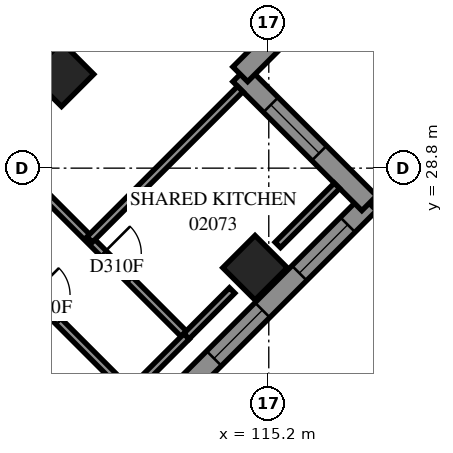
"""IFC4 building model, lengths in metres.
Left out: names, types, materials, properties, quantities, classifications, styles, units other than length and angle.
Written with IfcOpenShell. Run it as: python <this file> out.ifc"""

import sys

from ifc_helpers import new_model, si_unit, direction, frame, frame_2d, origin, origin_2d, place, context, subcontext, project, spatial, polyline, rectangle, outline, extrude, element, fill, save


model = new_model("IFC4")
c1 = context("Model", 3, precision=1e-05, world=origin(), true_north=direction((0.0, 1.0)))
c2 = subcontext(c1, "Body", "Model", "MODEL_VIEW")
j1 = project(units=[si_unit("LENGTHUNIT", "METRE"), si_unit("PLANEANGLEUNIT", "RADIAN")], contexts=[c1])
p1 = place(None, origin())
s1 = spatial("IfcSite", under=j1, at=p1, CompositionType="ELEMENT")
p2 = place(p1, origin())
s2 = spatial("IfcBuilding", under=s1, at=p2, CompositionType="ELEMENT")
p3 = place(p2, frame((0.0, 0.0, 10.2)))
s3 = spatial("IfcBuildingStorey", under=s2, at=p3, CompositionType="ELEMENT", Elevation=10.2)
for number, where, z_axis, x_axis in (
    (1, (109.747, 31.271, 0.0), (0.0, 0.0, 1.0), (0.707, -0.707, 0.0)),
    (2, (114.838, 26.18, 0.0), (0.0, 0.0, 1.0), (0.707, -0.707, 0.0)),
):
    element("IfcColumn", number, at=place(p3, frame(where, z_axis=z_axis, x_axis=x_axis)), inside=s3, PredefinedType="COLUMN", context=c2, shape_type="SweptSolid", body=[
        extrude(rectangle(XDim=1.2, YDim=1.2, at=origin_2d()), origin(), (0.0, 0.0, 1.0), 3.8),
    ])
p4 = place(p3, frame((104.656, 14.689, 0.0), z_axis=(0.0, 0.0, 1.0), x_axis=(0.7071094621, 0.7071041002, 0.0)))
e3 = element("IfcWall", 3, at=p4, inside=s3, PredefinedType="SOLIDWALL", context=c2, shape_type="SweptSolid", body=[
    extrude(outline(polyline([(-0.275, -0.275), (18.925, -0.275), (18.375, 0.275), (0.275, 0.275), (-0.275, -0.275)])), origin(), (0.0, 0.0, 1.0), 3.8),
])
p5 = place(p4, frame((1.825, 0.0, 0.7)))
e4 = element("IfcOpeningElement", 4, at=p5, cuts=e3, PredefinedType="OPENING", context=c2, shape_type="SweptSolid", body=[
    extrude(rectangle(XDim=1.8, YDim=2.6, at=frame_2d((0.9, 1.3))), frame((0.0, 0.285, 0.0), z_axis=(0.0, -1.0, 0.0), x_axis=(1.0, 0.0, 0.0)), (0.0, 0.0, 1.0), 0.57),
])
p6 = place(p4, frame((5.425, 0.0, 0.7)))
e5 = element("IfcOpeningElement", 5, at=p6, cuts=e3, PredefinedType="OPENING", context=c2, shape_type="SweptSolid", body=[
    extrude(rectangle(XDim=1.8, YDim=2.6, at=frame_2d((0.9, 1.3))), frame((0.0, 0.285, 0.0), z_axis=(0.0, -1.0, 0.0), x_axis=(1.0, 0.0, 0.0)), (0.0, 0.0, 1.0), 0.57),
])
p7 = place(p4, frame((8.725, 0.0, 0.7)))
e6 = element("IfcOpeningElement", 6, at=p7, cuts=e3, PredefinedType="OPENING", context=c2, shape_type="SweptSolid", body=[
    extrude(rectangle(XDim=1.8, YDim=2.6, at=frame_2d((0.9, 1.3))), frame((0.0, 0.285, 0.0), z_axis=(0.0, -1.0, 0.0), x_axis=(1.0, 0.0, 0.0)), (0.0, 0.0, 1.0), 0.57),
])
p8 = place(p4, frame((12.875, 0.0, 0.7)))
e7 = element("IfcOpeningElement", 7, at=p8, cuts=e3, PredefinedType="OPENING", context=c2, shape_type="SweptSolid", body=[
    extrude(rectangle(XDim=1.8, YDim=2.6, at=frame_2d((0.9, 1.3))), frame((0.0, 0.285, 0.0), z_axis=(0.0, -1.0, 0.0), x_axis=(1.0, 0.0, 0.0)), (0.0, 0.0, 1.0), 0.57),
])
p9 = place(p4, frame((16.05, 0.0, 0.7)))
e8 = element("IfcOpeningElement", 8, at=p9, cuts=e3, PredefinedType="OPENING", context=c2, shape_type="SweptSolid", body=[
    extrude(rectangle(XDim=1.8, YDim=2.6, at=frame_2d((0.9, 1.3))), frame((0.0, 0.285, 0.0), z_axis=(0.0, -1.0, 0.0), x_axis=(1.0, 0.0, 0.0)), (0.0, 0.0, 1.0), 0.57),
])
p10 = place(p3, frame((117.843, 27.877, 0.0), z_axis=(0.0, 0.0, 1.0), x_axis=(-0.7071067812, 0.7071067812, 0.0)))
e9 = element("IfcWall", 9, at=p10, inside=s3, PredefinedType="SOLIDWALL", context=c2, shape_type="SweptSolid", body=[
    extrude(outline(polyline([(-0.275, -0.275), (4.525, -0.275), (5.075, 0.275), (0.275, 0.275), (-0.275, -0.275)])), origin(), (0.0, 0.0, 1.0), 3.8),
])
p11 = place(p10, frame((1.863, 0.0, 0.7)))
e10 = element("IfcOpeningElement", 10, at=p11, cuts=e9, PredefinedType="OPENING", context=c2, shape_type="SweptSolid", body=[
    extrude(rectangle(XDim=1.8, YDim=2.6, at=frame_2d((0.9, 1.3))), frame((0.0, 0.285, 0.0), z_axis=(0.0, -1.0, 0.0), x_axis=(1.0, 0.0, 0.0)), (0.0, 0.0, 1.0), 0.57),
])
p12 = place(p3, frame((114.449, 31.271, 0.0), z_axis=(0.0, 0.0, 1.0), x_axis=(0.7070963646, 0.7071171977, 0.0)))
e11 = element("IfcWall", 11, at=p12, inside=s3, PredefinedType="SOLIDWALL", context=c2, shape_type="SweptSolid", body=[
    extrude(outline(polyline([(0.275, -0.275), (5.075, -0.275), (4.525, 0.275), (-0.275, 0.275), (0.275, -0.275)])), origin(), (0.0, 0.0, 1.0), 3.8),
])
p13 = place(p12, frame((1.137, 0.0, 0.7)))
e12 = element("IfcOpeningElement", 12, at=p13, cuts=e11, PredefinedType="OPENING", context=c2, shape_type="SweptSolid", body=[
    extrude(rectangle(XDim=1.8, YDim=2.6, at=frame_2d((0.9, 1.3))), frame((0.0, 0.285, 0.0), z_axis=(0.0, -1.0, 0.0), x_axis=(1.0, 0.0, 0.0)), (0.0, 0.0, 1.0), 0.57),
])
p14 = place(p3, frame((94.861, 42.544, 0.0), z_axis=(0.0, 0.0, 1.0), x_axis=(0.7071067812, -0.7071067812, 0.0)))
e13 = element("IfcWall", 13, at=p14, inside=s3, PredefinedType="PARTITIONING", context=c2, shape_type="SweptSolid", body=[
    extrude(rectangle(XDim=25.699, YDim=0.2, at=frame_2d((12.85, 0.0))), origin(), (0.0, 0.0, 1.0), 3.8),
])
p15 = place(p14, frame((10.072, 0.0, 0.0)))
e14 = element("IfcOpeningElement", 14, at=p15, cuts=e13, PredefinedType="OPENING", context=c2, shape_type="SweptSolid", body=[
    extrude(rectangle(XDim=1.0, YDim=2.1, at=frame_2d((0.5, 1.05))), frame((0.0, 0.11, 0.0), z_axis=(0.0, -1.0, 0.0), x_axis=(1.0, 0.0, 0.0)), (0.0, 0.0, 1.0), 0.22),
])
p16 = place(p14, frame((2.872, 0.0, 0.0)))
e15 = element("IfcOpeningElement", 15, at=p16, cuts=e13, PredefinedType="OPENING", context=c2, shape_type="SweptSolid", body=[
    extrude(rectangle(XDim=1.0, YDim=2.1, at=frame_2d((0.5, 1.05))), frame((0.0, 0.11, 0.0), z_axis=(0.0, -1.0, 0.0), x_axis=(1.0, 0.0, 0.0)), (0.0, 0.0, 1.0), 0.22),
])
p17 = place(p14, frame((17.272, 0.0, 0.0)))
e16 = element("IfcOpeningElement", 16, at=p17, cuts=e13, PredefinedType="OPENING", context=c2, shape_type="SweptSolid", body=[
    extrude(rectangle(XDim=1.0, YDim=2.1, at=frame_2d((0.5, 1.05))), frame((0.0, 0.11, 0.0), z_axis=(0.0, -1.0, 0.0), x_axis=(1.0, 0.0, 0.0)), (0.0, 0.0, 1.0), 0.22),
])
p18 = place(p14, frame((22.606, 0.0, 0.0)))
e17 = element("IfcOpeningElement", 17, at=p18, cuts=e13, PredefinedType="OPENING", context=c2, shape_type="SweptSolid", body=[
    extrude(rectangle(XDim=1.0, YDim=2.1, at=frame_2d((0.5, 1.05))), frame((0.0, 0.11, 0.0), z_axis=(0.0, -1.0, 0.0), x_axis=(1.0, 0.0, 0.0)), (0.0, 0.0, 1.0), 0.22),
])
p19 = place(p3, frame((93.375, 41.061, 0.0), z_axis=(0.0, 0.0, 1.0), x_axis=(0.7071067812, -0.7071067812, 0.0)))
e18 = element("IfcWall", 18, at=p19, inside=s3, PredefinedType="PARTITIONING", context=c2, shape_type="SweptSolid", body=[
    extrude(rectangle(XDim=25.699, YDim=0.2, at=frame_2d((12.85, 0.0))), origin(), (0.0, 0.0, 1.0), 3.8),
])
p20 = place(p19, frame((2.837, 0.0, 0.0)))
e19 = element("IfcOpeningElement", 19, at=p20, cuts=e18, PredefinedType="OPENING", context=c2, shape_type="SweptSolid", body=[
    extrude(rectangle(XDim=1.0, YDim=2.1, at=frame_2d((0.5, 1.05))), frame((0.0, 0.11, 0.0), z_axis=(0.0, -1.0, 0.0), x_axis=(1.0, 0.0, 0.0)), (0.0, 0.0, 1.0), 0.22),
])
p21 = place(p19, frame((10.037, 0.0, 0.0)))
e20 = element("IfcOpeningElement", 20, at=p21, cuts=e18, PredefinedType="OPENING", context=c2, shape_type="SweptSolid", body=[
    extrude(rectangle(XDim=1.0, YDim=2.1, at=frame_2d((0.5, 1.05))), frame((0.0, 0.11, 0.0), z_axis=(0.0, -1.0, 0.0), x_axis=(1.0, 0.0, 0.0)), (0.0, 0.0, 1.0), 0.22),
])
p22 = place(p19, frame((15.425, 0.0, 0.0)))
e21 = element("IfcOpeningElement", 21, at=p22, cuts=e18, PredefinedType="OPENING", context=c2, shape_type="SweptSolid", body=[
    extrude(rectangle(XDim=1.0, YDim=2.1, at=frame_2d((0.5, 1.05))), frame((0.0, 0.11, 0.0), z_axis=(0.0, -1.0, 0.0), x_axis=(1.0, 0.0, 0.0)), (0.0, 0.0, 1.0), 0.22),
])
p23 = place(p19, frame((22.057, 0.0, 0.0)))
e22 = element("IfcOpeningElement", 22, at=p23, cuts=e18, PredefinedType="OPENING", context=c2, shape_type="SweptSolid", body=[
    extrude(rectangle(XDim=1.0, YDim=2.1, at=frame_2d((0.5, 1.05))), frame((0.0, 0.11, 0.0), z_axis=(0.0, -1.0, 0.0), x_axis=(1.0, 0.0, 0.0)), (0.0, 0.0, 1.0), 0.22),
])
p24 = place(p3, frame((110.489, 26.923, 0.0), z_axis=(0.0, 0.0, 1.0), x_axis=(0.7071067812, 0.7071067812, 0.0)))
e23 = element("IfcWall", 23, at=p24, inside=s3, PredefinedType="PARTITIONING", context=c2, shape_type="SweptSolid", body=[
    extrude(rectangle(XDim=5.6, YDim=0.2, at=frame_2d((2.8, 0.0))), origin(), (0.0, 0.0, 1.0), 3.8),
])
p25 = place(p3, frame((115.438, 26.78, 0.0), z_axis=(0.0, 0.0, 1.0), x_axis=(0.7071067812, 0.7071067812, 0.0)))
e24 = element("IfcWall", 24, at=p25, inside=s3, PredefinedType="PARTITIONING", context=c2, shape_type="SweptSolid", body=[
    extrude(rectangle(XDim=2.201, YDim=0.2, at=frame_2d((1.101, 0.0))), origin(), (0.0, 0.0, 1.0), 3.8),
])
p26 = place(p3, frame((111.552, 22.89, 0.0), z_axis=(0.0, 0.0, 1.0), x_axis=(0.7075827869, 0.7066304548, 0.0)))
e25 = element("IfcWall", 25, at=p26, inside=s3, PredefinedType="PARTITIONING", context=c2, shape_type="SweptSolid", body=[
    extrude(rectangle(XDim=2.1, YDim=0.2, at=frame_2d((1.05, 0.0))), origin(), (0.0, 0.0, 1.0), 3.2),
])
p27 = place(p3, frame((113.034, 24.378, 0.0), z_axis=(0.0, 0.0, 1.0), x_axis=(0.7065187509, 0.7076943229, 0.0)))
e26 = element("IfcWall", 26, at=p27, inside=s3, PredefinedType="PARTITIONING", context=c2, shape_type="SweptSolid", body=[
    extrude(rectangle(XDim=1.701, YDim=0.2, at=frame_2d((0.851, 0.0))), origin(), (0.0, 0.0, 1.0), 3.2),
])
p28 = place(p8, origin())
e27 = element("IfcWindow", 27, at=p28, inside=s3, PartitioningType="SINGLE_PANEL", PredefinedType="WINDOW", context=c2, shape_type="SweptSolid", body=[
    extrude(rectangle(XDim=1.8, YDim=2.6, at=frame_2d((0.9, 1.3))), frame((0.0, 0.155, 0.0), z_axis=(0.0, -1.0, 0.0), x_axis=(1.0, 0.0, 0.0)), (0.0, 0.0, 1.0), 0.06),
])
fill(e7, e27)
p29 = place(p9, origin())
e28 = element("IfcWindow", 28, at=p29, inside=s3, PartitioningType="SINGLE_PANEL", PredefinedType="WINDOW", context=c2, shape_type="SweptSolid", body=[
    extrude(rectangle(XDim=1.8, YDim=2.6, at=frame_2d((0.9, 1.3))), frame((0.0, 0.155, 0.0), z_axis=(0.0, -1.0, 0.0), x_axis=(1.0, 0.0, 0.0)), (0.0, 0.0, 1.0), 0.06),
])
fill(e8, e28)
p30 = place(p11, origin())
e29 = element("IfcWindow", 29, at=p30, inside=s3, PartitioningType="SINGLE_PANEL", PredefinedType="WINDOW", context=c2, shape_type="SweptSolid", body=[
    extrude(rectangle(XDim=1.8, YDim=2.6, at=frame_2d((0.9, 1.3))), frame((0.0, 0.155, 0.0), z_axis=(0.0, -1.0, 0.0), x_axis=(1.0, 0.0, 0.0)), (0.0, 0.0, 1.0), 0.06),
])
fill(e10, e29)
p31 = place(p23, origin())
e30 = element("IfcDoor", 30, at=p31, inside=s3, OperationType="SINGLE_SWING_RIGHT", PredefinedType="DOOR", context=c2, shape_type="SweptSolid", body=[
    extrude(rectangle(XDim=1.0, YDim=2.1, at=frame_2d((0.5, 1.05))), frame((0.0, 0.025, 0.0), z_axis=(0.0, -1.0, 0.0), x_axis=(1.0, 0.0, 0.0)), (0.0, 0.0, 1.0), 0.05),
])
fill(e22, e30)
p32 = place(p18, origin())
e31 = element("IfcDoor", 31, at=p32, inside=s3, OperationType="SINGLE_SWING_RIGHT", PredefinedType="DOOR", context=c2, shape_type="SweptSolid", body=[
    extrude(rectangle(XDim=1.0, YDim=2.1, at=frame_2d((0.5, 1.05))), frame((0.0, 0.025, 0.0), z_axis=(0.0, -1.0, 0.0), x_axis=(1.0, 0.0, 0.0)), (0.0, 0.0, 1.0), 0.05),
])
fill(e17, e31)
save(model, sys.argv[1])
